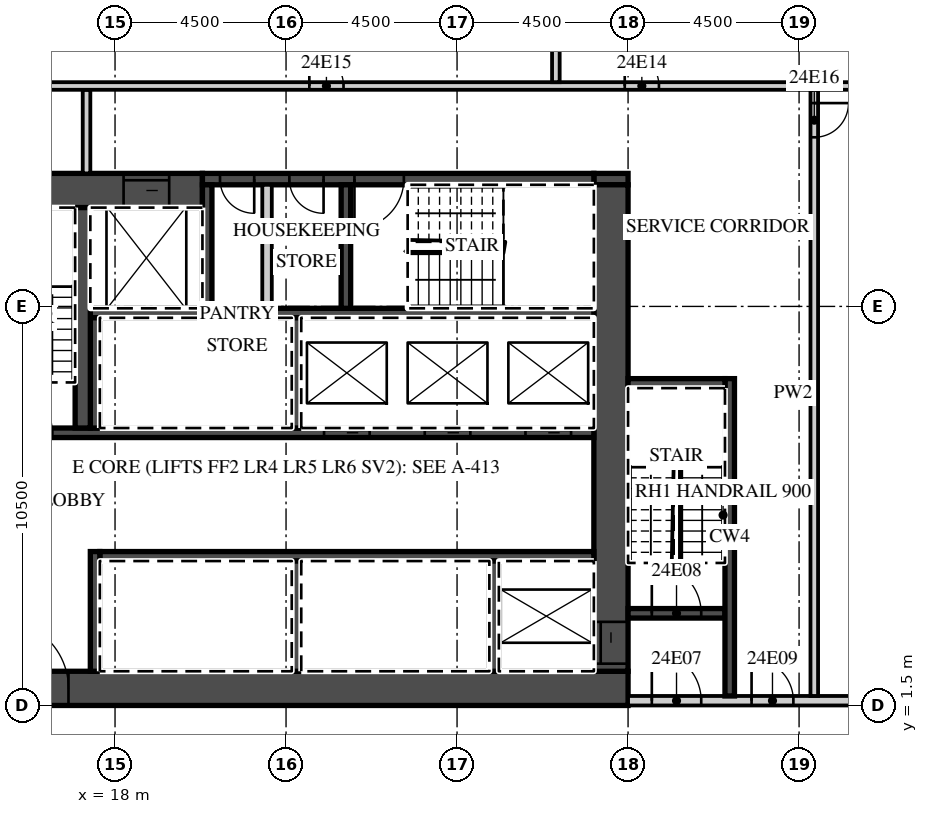
"""IFC4 building model, lengths in metres.
Left out: names, types, materials, properties, quantities, classifications, styles, units other than length and angle.
Written with IfcOpenShell. Run it as: python <this file> out.ifc"""

import sys

from ifc_helpers import new_model, si_unit, direction, frame, frame_2d, origin, place, context, subcontext, project, spatial, rectangle, extrude, element, fill, save


model = new_model("IFC4")
c1 = context("Model", 3, precision=1e-05, world=origin(), true_north=direction((0.0, 1.0)))
c2 = subcontext(c1, "Body", "Model", "MODEL_VIEW")
j1 = project(units=[si_unit("LENGTHUNIT", "METRE"), si_unit("PLANEANGLEUNIT", "RADIAN")], contexts=[c1])
p1 = place(None, origin())
s1 = spatial("IfcSite", under=j1, at=p1, CompositionType="ELEMENT")
p2 = place(p1, origin())
s2 = spatial("IfcBuilding", under=s1, at=p2, CompositionType="ELEMENT")
p3 = place(p2, frame((0.0, 0.0, 114.1)))
s3 = spatial("IfcBuildingStorey", under=s2, at=p3, CompositionType="ELEMENT", Elevation=114.1)
p4 = place(p3, frame((13.5, 1.95, 0.0), z_axis=(0.0, 0.0, 1.0), x_axis=(1.0, 0.0, 0.0)))
e1 = element("IfcWall", 1, at=p4, inside=s3, PredefinedType="SHEAR", context=c2, shape_type="SweptSolid", body=[
    extrude(rectangle(XDim=18.0, YDim=0.9, at=frame_2d((9.0, 0.0))), origin(), (0.0, 0.0, 1.0), 3.02),
])
p5 = place(p4, frame((1.475, 0.0, 0.0)))
e2 = element("IfcOpeningElement", 2, at=p5, cuts=e1, PredefinedType="OPENING", context=c2, shape_type="SweptSolid", body=[
    extrude(rectangle(XDim=1.8, YDim=2.1, at=frame_2d((0.9, 1.05))), frame((0.0, 0.46, 0.0), z_axis=(0.0, -1.0, 0.0), x_axis=(1.0, 0.0, 0.0)), (0.0, 0.0, 1.0), 0.92),
])
p6 = place(p3, frame((13.5, 15.05, 0.0), z_axis=(0.0, 0.0, 1.0), x_axis=(1.0, 0.0, 0.0)))
e3 = element("IfcWall", 3, at=p6, inside=s3, PredefinedType="SHEAR", context=c2, shape_type="SweptSolid", body=[
    extrude(rectangle(XDim=6.8, YDim=0.9, at=frame_2d((3.4, 0.0))), origin(), (0.0, 0.0, 1.0), 3.02),
])
p7 = place(p6, frame((4.725, 0.0, 0.0)))
e4 = element("IfcOpeningElement", 4, at=p7, cuts=e3, PredefinedType="OPENING", context=c2, shape_type="SweptSolid", body=[
    extrude(rectangle(XDim=1.2, YDim=2.1, at=frame_2d((0.6, 1.05))), frame((0.0, 0.46, 0.0), z_axis=(0.0, -1.0, 0.0), x_axis=(1.0, 0.0, 0.0)), (0.0, 0.0, 1.0), 0.92),
])
p8 = place(p3, frame((30.6, 15.35, 0.0), z_axis=(0.0, 0.0, 1.0), x_axis=(1.0, 0.0, 0.0)))
e5 = element("IfcWall", 5, at=p8, inside=s3, PredefinedType="SHEAR", context=c2, shape_type="SweptSolid", body=[
    extrude(rectangle(XDim=0.9, YDim=0.3, at=frame_2d((0.45, 0.0))), origin(), (0.0, 0.0, 1.0), 3.02),
])
p9 = place(p3, frame((20.3, 15.35, 0.0), z_axis=(0.0, 0.0, 1.0), x_axis=(1.0, 0.0, 0.0)))
e6 = element("IfcWall", 6, at=p9, inside=s3, PredefinedType="SHEAR", context=c2, shape_type="SweptSolid", body=[
    extrude(rectangle(XDim=10.3, YDim=0.3, at=frame_2d((5.15, 0.0))), origin(), (0.0, 0.0, 1.0), 3.02),
])
p10 = place(p9, frame((4.0, 0.0, 0.0)))
e7 = element("IfcOpeningElement", 7, at=p10, cuts=e6, PredefinedType="OPENING", context=c2, shape_type="SweptSolid", body=[
    extrude(rectangle(XDim=1.3, YDim=2.1, at=frame_2d((0.65, 1.05))), frame((0.0, 0.16, 0.0), z_axis=(0.0, -1.0, 0.0), x_axis=(1.0, 0.0, 0.0)), (0.0, 0.0, 1.0), 0.32),
])
p11 = place(p9, frame((2.288, 0.0, 0.0)))
e8 = element("IfcOpeningElement", 8, at=p11, cuts=e6, PredefinedType="OPENING", context=c2, shape_type="SweptSolid", body=[
    extrude(rectangle(XDim=0.9, YDim=2.1, at=frame_2d((0.45, 1.05))), frame((0.0, 0.16, 0.0), z_axis=(0.0, -1.0, 0.0), x_axis=(1.0, 0.0, 0.0)), (0.0, 0.0, 1.0), 0.32),
])
p12 = place(p9, frame((0.462, 0.0, 0.0)))
e9 = element("IfcOpeningElement", 9, at=p12, cuts=e6, PredefinedType="OPENING", context=c2, shape_type="SweptSolid", body=[
    extrude(rectangle(XDim=0.9, YDim=2.1, at=frame_2d((0.45, 1.05))), frame((0.0, 0.16, 0.0), z_axis=(0.0, -1.0, 0.0), x_axis=(1.0, 0.0, 0.0)), (0.0, 0.0, 1.0), 0.32),
])
p13 = place(p3, frame((31.05, 2.4, 0.0), z_axis=(0.0, 0.0, 1.0), x_axis=(0.0, 1.0, 0.0)))
e10 = element("IfcWall", 10, at=p13, inside=s3, PredefinedType="SHEAR", context=c2, shape_type="SweptSolid", body=[
    extrude(rectangle(XDim=12.8, YDim=0.9, at=frame_2d((6.4, 0.0))), origin(), (0.0, 0.0, 1.0), 3.02),
])
p14 = place(p13, frame((0.2, 0.0, 0.0)))
e11 = element("IfcOpeningElement", 11, at=p14, cuts=e10, PredefinedType="OPENING", context=c2, shape_type="SweptSolid", body=[
    extrude(rectangle(XDim=1.1, YDim=2.1, at=frame_2d((0.55, 1.05))), frame((0.0, 0.46, 0.0), z_axis=(0.0, -1.0, 0.0), x_axis=(1.0, 0.0, 0.0)), (0.0, 0.0, 1.0), 0.92),
])
p15 = place(p3, frame((17.6, 5.425, 0.0), z_axis=(0.0, 0.0, 1.0), x_axis=(1.0, 0.0, 0.0)))
e12 = element("IfcWall", 12, at=p15, inside=s3, PredefinedType="SHEAR", context=c2, shape_type="SweptSolid", body=[
    extrude(rectangle(XDim=13.0, YDim=0.25, at=frame_2d((6.5, 0.0))), origin(), (0.0, 0.0, 1.0), 3.02),
])
p16 = place(p3, frame((17.475, 2.4, 0.0), z_axis=(0.0, 0.0, 1.0), x_axis=(0.0, 1.0, 0.0)))
e13 = element("IfcWall", 13, at=p16, inside=s3, PredefinedType="SHEAR", context=c2, shape_type="SweptSolid", body=[
    extrude(rectangle(XDim=3.15, YDim=0.25, at=frame_2d((1.575, 0.0))), origin(), (0.0, 0.0, 1.0), 3.02),
])
for number, where, z_axis, x_axis in (
    (14, (27.975, 2.4, 0.0), (0.0, 0.0, 1.0), (0.0, 1.0, 0.0)),
    (15, (22.775, 2.4, 0.0), (0.0, 0.0, 1.0), (0.0, 1.0, 0.0)),
):
    element("IfcWall", number, at=place(p3, frame(where, z_axis=z_axis, x_axis=x_axis)), inside=s3, PredefinedType="SHEAR", context=c2, shape_type="SweptSolid", body=[
        extrude(rectangle(XDim=2.9, YDim=0.25, at=frame_2d((1.45, 0.0))), origin(), (0.0, 0.0, 1.0), 3.02),
    ])
p17 = place(p3, frame((14.4, 8.675, 0.0), z_axis=(0.0, 0.0, 1.0), x_axis=(1.0, 0.0, 0.0)))
e16 = element("IfcWall", 16, at=p17, inside=s3, PredefinedType="SHEAR", context=c2, shape_type="SweptSolid", body=[
    extrude(rectangle(XDim=16.2, YDim=0.25, at=frame_2d((8.1, 0.0))), origin(), (0.0, 0.0, 1.0), 3.02),
])
p18 = place(p17, frame((14.4, 0.0, 0.0)))
e17 = element("IfcOpeningElement", 17, at=p18, cuts=e16, PredefinedType="OPENING", context=c2, shape_type="SweptSolid", body=[
    extrude(rectangle(XDim=1.2, YDim=2.1, at=frame_2d((0.6, 1.05))), frame((0.0, 0.135, 0.0), z_axis=(0.0, -1.0, 0.0), x_axis=(1.0, 0.0, 0.0)), (0.0, 0.0, 1.0), 0.27),
])
p19 = place(p17, frame((11.75, 0.0, 0.0)))
e18 = element("IfcOpeningElement", 18, at=p19, cuts=e16, PredefinedType="OPENING", context=c2, shape_type="SweptSolid", body=[
    extrude(rectangle(XDim=1.2, YDim=2.1, at=frame_2d((0.6, 1.05))), frame((0.0, 0.135, 0.0), z_axis=(0.0, -1.0, 0.0), x_axis=(1.0, 0.0, 0.0)), (0.0, 0.0, 1.0), 0.27),
])
p20 = place(p17, frame((9.1, 0.0, 0.0)))
e19 = element("IfcOpeningElement", 19, at=p20, cuts=e16, PredefinedType="OPENING", context=c2, shape_type="SweptSolid", body=[
    extrude(rectangle(XDim=1.2, YDim=2.1, at=frame_2d((0.6, 1.05))), frame((0.0, 0.135, 0.0), z_axis=(0.0, -1.0, 0.0), x_axis=(1.0, 0.0, 0.0)), (0.0, 0.0, 1.0), 0.27),
])
p21 = place(p17, frame((0.65, 0.0, 0.0)))
e20 = element("IfcOpeningElement", 20, at=p21, cuts=e16, PredefinedType="OPENING", context=c2, shape_type="SweptSolid", body=[
    extrude(rectangle(XDim=1.3, YDim=2.1, at=frame_2d((0.65, 1.05))), frame((0.0, 0.135, 0.0), z_axis=(0.0, -1.0, 0.0), x_axis=(1.0, 0.0, 0.0)), (0.0, 0.0, 1.0), 0.27),
])
p22 = place(p3, frame((17.35, 11.825, 0.0), z_axis=(0.0, 0.0, 1.0), x_axis=(1.0, 0.0, 0.0)))
e21 = element("IfcWall", 21, at=p22, inside=s3, PredefinedType="SHEAR", context=c2, shape_type="SweptSolid", body=[
    extrude(rectangle(XDim=13.25, YDim=0.25, at=frame_2d((6.625, 0.0))), origin(), (0.0, 0.0, 1.0), 3.02),
])
for number, where, z_axis, x_axis in (
    (22, (17.475, 8.8, 0.0), (0.0, 0.0, 1.0), (0.0, 1.0, 0.0)),
    (23, (22.775, 8.8, 0.0), (0.0, 0.0, 1.0), (0.0, 1.0, 0.0)),
):
    element("IfcWall", number, at=place(p3, frame(where, z_axis=z_axis, x_axis=x_axis)), inside=s3, PredefinedType="SHEAR", context=c2, shape_type="SweptSolid", body=[
        extrude(rectangle(XDim=2.9, YDim=0.25, at=frame_2d((1.45, 0.0))), origin(), (0.0, 0.0, 1.0), 3.02),
    ])
p23 = place(p3, frame((17.15, 8.8, 0.0), z_axis=(0.0, 0.0, 1.0), x_axis=(0.0, 1.0, 0.0)))
e24 = element("IfcWall", 24, at=p23, inside=s3, PredefinedType="SHEAR", context=c2, shape_type="SweptSolid", body=[
    extrude(rectangle(XDim=5.8, YDim=0.4, at=frame_2d((2.9, 0.0))), origin(), (0.0, 0.0, 1.0), 3.02),
])
for number, where, z_axis, x_axis in (
    (25, (20.425, 11.95, 0.0), (0.0, 0.0, 1.0), (0.0, 1.0, 0.0)),
    (26, (24.075, 11.95, 0.0), (0.0, 0.0, 1.0), (0.0, 1.0, 0.0)),
):
    element("IfcWall", number, at=place(p3, frame(where, z_axis=z_axis, x_axis=x_axis)), inside=s3, PredefinedType="SHEAR", context=c2, shape_type="SweptSolid", body=[
        extrude(rectangle(XDim=3.25, YDim=0.25, at=frame_2d((1.625, 0.0))), origin(), (0.0, 0.0, 1.0), 3.02),
    ])
p24 = place(p3, frame((22.0, 11.95, 0.0), z_axis=(0.0, 0.0, 1.0), x_axis=(0.0, 1.0, 0.0)))
e27 = element("IfcWall", 27, at=p24, inside=s3, PredefinedType="PARTITIONING", context=c2, shape_type="SweptSolid", body=[
    extrude(rectangle(XDim=3.25, YDim=0.25, at=frame_2d((1.625, 0.0))), origin(), (0.0, 0.0, 1.0), 3.02),
])
p25 = place(p3, frame((31.5, 1.625, 0.0), z_axis=(0.0, 0.0, 1.0), x_axis=(1.0, 0.0, 0.0)))
e28 = element("IfcWall", 28, at=p25, inside=s3, PredefinedType="PARTITIONING", context=c2, shape_type="SweptSolid", body=[
    extrude(rectangle(XDim=15.65, YDim=0.25, at=frame_2d((7.825, 0.0))), origin(), (0.0, 0.0, 1.0), 3.02),
])
p26 = place(p25, frame((0.625, 0.0, 0.0)))
e29 = element("IfcOpeningElement", 29, at=p26, cuts=e28, PredefinedType="OPENING", context=c2, shape_type="SweptSolid", body=[
    extrude(rectangle(XDim=1.3, YDim=2.1, at=frame_2d((0.65, 1.05))), frame((0.0, 0.135, 0.0), z_axis=(0.0, -1.0, 0.0), x_axis=(1.0, 0.0, 0.0)), (0.0, 0.0, 1.0), 0.27),
])
p27 = place(p25, frame((3.25, 0.0, 0.0)))
e30 = element("IfcOpeningElement", 30, at=p27, cuts=e28, PredefinedType="OPENING", context=c2, shape_type="SweptSolid", body=[
    extrude(rectangle(XDim=1.1, YDim=2.1, at=frame_2d((0.55, 1.05))), frame((0.0, 0.135, 0.0), z_axis=(0.0, -1.0, 0.0), x_axis=(1.0, 0.0, 0.0)), (0.0, 0.0, 1.0), 0.27),
])
p28 = place(p3, frame((31.5, 3.925, 0.0), z_axis=(0.0, 0.0, 1.0), x_axis=(1.0, 0.0, 0.0)))
e31 = element("IfcWall", 31, at=p28, inside=s3, PredefinedType="SHEAR", context=c2, shape_type="SweptSolid", body=[
    extrude(rectangle(XDim=2.55, YDim=0.25, at=frame_2d((1.275, 0.0))), origin(), (0.0, 0.0, 1.0), 3.02),
])
p29 = place(p28, frame((0.625, 0.0, 0.0)))
e32 = element("IfcOpeningElement", 32, at=p29, cuts=e31, PredefinedType="OPENING", context=c2, shape_type="SweptSolid", body=[
    extrude(rectangle(XDim=1.3, YDim=2.1, at=frame_2d((0.65, 1.05))), frame((0.0, 0.135, 0.0), z_axis=(0.0, -1.0, 0.0), x_axis=(1.0, 0.0, 0.0)), (0.0, 0.0, 1.0), 0.27),
])
p30 = place(p3, frame((34.175, 1.75, 0.0), z_axis=(0.0, 0.0, 1.0), x_axis=(0.0, 1.0, 0.0)))
e33 = element("IfcWall", 33, at=p30, inside=s3, PredefinedType="SHEAR", context=c2, shape_type="SweptSolid", body=[
    extrude(rectangle(XDim=8.35, YDim=0.25, at=frame_2d((4.175, 0.0))), origin(), (0.0, 0.0, 1.0), 3.02),
])
p31 = place(p3, frame((31.5, 9.975, 0.0), z_axis=(0.0, 0.0, 1.0), x_axis=(1.0, 0.0, 0.0)))
e34 = element("IfcWall", 34, at=p31, inside=s3, PredefinedType="SHEAR", context=c2, shape_type="SweptSolid", body=[
    extrude(rectangle(XDim=2.55, YDim=0.25, at=frame_2d((1.275, 0.0))), origin(), (0.0, 0.0, 1.0), 3.02),
])
p32 = place(p3, frame((17.25, 15.5, 0.0), z_axis=(0.0, 0.0, 1.0), x_axis=(0.0, 1.0, 0.0)))
e35 = element("IfcWall", 35, at=p32, inside=s3, PredefinedType="PARTITIONING", context=c2, shape_type="SweptSolid", body=[
    extrude(rectangle(XDim=2.2, YDim=0.2, at=frame_2d((1.1, 0.0))), origin(), (0.0, 0.0, 1.0), 3.02),
])
p33 = place(p3, frame((36.4, 1.75, 0.0), z_axis=(0.0, 0.0, 1.0), x_axis=(0.0, 1.0, 0.0)))
e36 = element("IfcWall", 36, at=p33, inside=s3, PredefinedType="PARTITIONING", context=c2, shape_type="SweptSolid", body=[
    extrude(rectangle(XDim=15.95, YDim=0.2, at=frame_2d((7.975, 0.0))), origin(), (0.0, 0.0, 1.0), 3.02),
])
p34 = place(p33, frame((14.7, 0.0, 0.0)))
e37 = element("IfcOpeningElement", 37, at=p34, cuts=e36, PredefinedType="OPENING", context=c2, shape_type="SweptSolid", body=[
    extrude(rectangle(XDim=0.9, YDim=2.1, at=frame_2d((0.45, 1.05))), frame((0.0, 0.11, 0.0), z_axis=(0.0, -1.0, 0.0), x_axis=(1.0, 0.0, 0.0)), (0.0, 0.0, 1.0), 0.22),
])
p35 = place(p3, frame((13.6, 17.8, 0.0), z_axis=(0.0, 0.0, 1.0), x_axis=(1.0, 0.0, 0.0)))
e38 = element("IfcWall", 38, at=p35, inside=s3, PredefinedType="PARTITIONING", context=c2, shape_type="SweptSolid", body=[
    extrude(rectangle(XDim=31.993, YDim=0.2, at=frame_2d((15.997, 0.0))), origin(), (0.0, 0.0, 1.0), 3.02),
])
p36 = place(p35, frame((17.812, 0.0, 0.0)))
e39 = element("IfcOpeningElement", 39, at=p36, cuts=e38, PredefinedType="OPENING", context=c2, shape_type="SweptSolid", body=[
    extrude(rectangle(XDim=0.9, YDim=2.1, at=frame_2d((0.45, 1.05))), frame((0.0, 0.11, 0.0), z_axis=(0.0, -1.0, 0.0), x_axis=(1.0, 0.0, 0.0)), (0.0, 0.0, 1.0), 0.22),
])
p37 = place(p35, frame((9.512, 0.0, 0.0)))
e40 = element("IfcOpeningElement", 40, at=p37, cuts=e38, PredefinedType="OPENING", context=c2, shape_type="SweptSolid", body=[
    extrude(rectangle(XDim=0.9, YDim=2.1, at=frame_2d((0.45, 1.05))), frame((0.0, 0.11, 0.0), z_axis=(0.0, -1.0, 0.0), x_axis=(1.0, 0.0, 0.0)), (0.0, 0.0, 1.0), 0.22),
])
p38 = place(p3, frame((29.6, 17.9, 0.0), z_axis=(0.0, 0.0, 1.0), x_axis=(0.0, 1.0, 0.0)))
e41 = element("IfcWall", 41, at=p38, inside=s3, PredefinedType="PARTITIONING", context=c2, shape_type="SweptSolid", body=[
    extrude(rectangle(XDim=6.313, YDim=0.2, at=frame_2d((3.157, 0.0))), origin(), (0.0, 0.0, 1.0), 3.02),
])
p39 = place(p18, origin())
e42 = element("IfcDoor", 42, at=p39, inside=s3, OperationType="SLIDING_TO_LEFT", PredefinedType="DOOR", context=c2, shape_type="SweptSolid", body=[
    extrude(rectangle(XDim=1.2, YDim=2.1, at=frame_2d((0.6, 1.05))), frame((0.0, 0.025, 0.0), z_axis=(0.0, -1.0, 0.0), x_axis=(1.0, 0.0, 0.0)), (0.0, 0.0, 1.0), 0.05),
])
fill(e17, e42)
p40 = place(p19, origin())
e43 = element("IfcDoor", 43, at=p40, inside=s3, OperationType="SLIDING_TO_RIGHT", PredefinedType="DOOR", context=c2, shape_type="SweptSolid", body=[
    extrude(rectangle(XDim=1.2, YDim=2.1, at=frame_2d((0.6, 1.05))), frame((0.0, 0.025, 0.0), z_axis=(0.0, -1.0, 0.0), x_axis=(1.0, 0.0, 0.0)), (0.0, 0.0, 1.0), 0.05),
])
fill(e18, e43)
p41 = place(p20, origin())
e44 = element("IfcDoor", 44, at=p41, inside=s3, OperationType="SLIDING_TO_RIGHT", PredefinedType="DOOR", context=c2, shape_type="SweptSolid", body=[
    extrude(rectangle(XDim=1.2, YDim=2.1, at=frame_2d((0.6, 1.05))), frame((0.0, 0.025, 0.0), z_axis=(0.0, -1.0, 0.0), x_axis=(1.0, 0.0, 0.0)), (0.0, 0.0, 1.0), 0.05),
])
fill(e19, e44)
p42 = place(p7, origin())
e45 = element("IfcDoor", 45, at=p42, inside=s3, OperationType="SLIDING_TO_LEFT", PredefinedType="DOOR", context=c2, shape_type="SweptSolid", body=[
    extrude(rectangle(XDim=1.2, YDim=2.1, at=frame_2d((0.6, 1.05))), frame((0.0, 0.025, 0.0), z_axis=(0.0, -1.0, 0.0), x_axis=(1.0, 0.0, 0.0)), (0.0, 0.0, 1.0), 0.05),
])
fill(e4, e45)
p43 = place(p14, origin())
e46 = element("IfcDoor", 46, at=p43, inside=s3, OperationType="SLIDING_TO_LEFT", PredefinedType="DOOR", context=c2, shape_type="SweptSolid", body=[
    extrude(rectangle(XDim=1.1, YDim=2.1, at=frame_2d((0.55, 1.05))), frame((0.0, 0.025, 0.0), z_axis=(0.0, -1.0, 0.0), x_axis=(1.0, 0.0, 0.0)), (0.0, 0.0, 1.0), 0.05),
])
fill(e11, e46)
p44 = place(p5, origin())
e47 = element("IfcDoor", 47, at=p44, inside=s3, OperationType="DOUBLE_DOOR_DOUBLE_SWING", PredefinedType="DOOR", context=c2, shape_type="SweptSolid", body=[
    extrude(rectangle(XDim=1.8, YDim=2.1, at=frame_2d((0.9, 1.05))), frame((0.0, 0.025, 0.0), z_axis=(0.0, -1.0, 0.0), x_axis=(1.0, 0.0, 0.0)), (0.0, 0.0, 1.0), 0.05),
])
fill(e2, e47)
p45 = place(p26, origin())
e48 = element("IfcDoor", 48, at=p45, inside=s3, OperationType="SINGLE_SWING_LEFT", PredefinedType="DOOR", context=c2, shape_type="SweptSolid", body=[
    extrude(rectangle(XDim=1.3, YDim=2.1, at=frame_2d((0.65, 1.05))), frame((0.0, 0.025, 0.0), z_axis=(0.0, -1.0, 0.0), x_axis=(1.0, 0.0, 0.0)), (0.0, 0.0, 1.0), 0.05),
])
fill(e29, e48)
p46 = place(p29, origin())
e49 = element("IfcDoor", 49, at=p46, inside=s3, OperationType="SINGLE_SWING_LEFT", PredefinedType="DOOR", context=c2, shape_type="SweptSolid", body=[
    extrude(rectangle(XDim=1.3, YDim=2.1, at=frame_2d((0.65, 1.05))), frame((0.0, 0.025, 0.0), z_axis=(0.0, -1.0, 0.0), x_axis=(1.0, 0.0, 0.0)), (0.0, 0.0, 1.0), 0.05),
])
fill(e32, e49)
p47 = place(p27, origin())
e50 = element("IfcDoor", 50, at=p47, inside=s3, OperationType="SINGLE_SWING_LEFT", PredefinedType="DOOR", context=c2, shape_type="SweptSolid", body=[
    extrude(rectangle(XDim=1.1, YDim=2.1, at=frame_2d((0.55, 1.05))), frame((0.0, 0.025, 0.0), z_axis=(0.0, -1.0, 0.0), x_axis=(1.0, 0.0, 0.0)), (0.0, 0.0, 1.0), 0.05),
])
fill(e30, e50)
p48 = place(p10, origin())
e51 = element("IfcDoor", 51, at=p48, inside=s3, OperationType="SINGLE_SWING_LEFT", PredefinedType="DOOR", context=c2, shape_type="SweptSolid", body=[
    extrude(rectangle(XDim=1.3, YDim=2.1, at=frame_2d((0.65, 1.05))), frame((0.0, 0.025, 0.0), z_axis=(0.0, -1.0, 0.0), x_axis=(1.0, 0.0, 0.0)), (0.0, 0.0, 1.0), 0.05),
])
fill(e7, e51)
p49 = place(p11, origin())
e52 = element("IfcDoor", 52, at=p49, inside=s3, OperationType="SINGLE_SWING_RIGHT", PredefinedType="DOOR", context=c2, shape_type="SweptSolid", body=[
    extrude(rectangle(XDim=0.9, YDim=2.1, at=frame_2d((0.45, 1.05))), frame((0.0, 0.025, 0.0), z_axis=(0.0, -1.0, 0.0), x_axis=(1.0, 0.0, 0.0)), (0.0, 0.0, 1.0), 0.05),
])
fill(e8, e52)
p50 = place(p12, origin())
e53 = element("IfcDoor", 53, at=p50, inside=s3, OperationType="SINGLE_SWING_RIGHT", PredefinedType="DOOR", context=c2, shape_type="SweptSolid", body=[
    extrude(rectangle(XDim=0.9, YDim=2.1, at=frame_2d((0.45, 1.05))), frame((0.0, 0.025, 0.0), z_axis=(0.0, -1.0, 0.0), x_axis=(1.0, 0.0, 0.0)), (0.0, 0.0, 1.0), 0.05),
])
fill(e9, e53)
p51 = place(p36, origin())
e54 = element("IfcDoor", 54, at=p51, inside=s3, OperationType="SINGLE_SWING_LEFT", PredefinedType="DOOR", context=c2, shape_type="SweptSolid", body=[
    extrude(rectangle(XDim=0.9, YDim=2.1, at=frame_2d((0.45, 1.05))), frame((0.0, 0.025, 0.0), z_axis=(0.0, -1.0, 0.0), x_axis=(1.0, 0.0, 0.0)), (0.0, 0.0, 1.0), 0.05),
])
fill(e39, e54)
p52 = place(p37, origin())
e55 = element("IfcDoor", 55, at=p52, inside=s3, OperationType="SINGLE_SWING_LEFT", PredefinedType="DOOR", context=c2, shape_type="SweptSolid", body=[
    extrude(rectangle(XDim=0.9, YDim=2.1, at=frame_2d((0.45, 1.05))), frame((0.0, 0.025, 0.0), z_axis=(0.0, -1.0, 0.0), x_axis=(1.0, 0.0, 0.0)), (0.0, 0.0, 1.0), 0.05),
])
fill(e40, e55)
p53 = place(p34, origin())
e56 = element("IfcDoor", 56, at=p53, inside=s3, OperationType="SINGLE_SWING_RIGHT", PredefinedType="DOOR", context=c2, shape_type="SweptSolid", body=[
    extrude(rectangle(XDim=0.9, YDim=2.1, at=frame_2d((0.45, 1.05))), frame((0.0, 0.025, 0.0), z_axis=(0.0, -1.0, 0.0), x_axis=(1.0, 0.0, 0.0)), (0.0, 0.0, 1.0), 0.05),
])
fill(e37, e56)
save(model, sys.argv[1])
